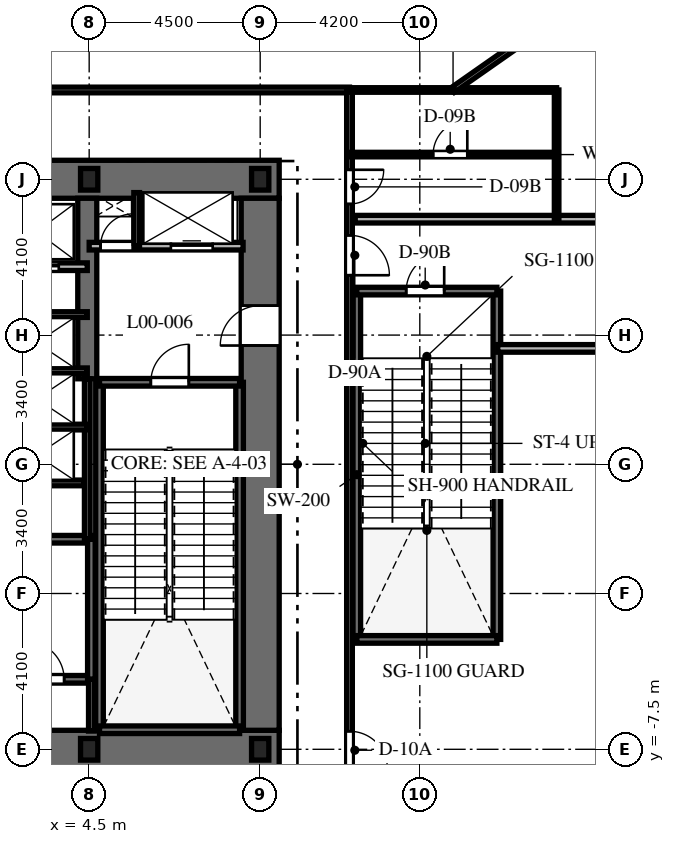
"""IFC4 building model, lengths in metres.
Left out: names, types, materials, properties, quantities, classifications, styles, units other than length and angle.
Written with IfcOpenShell. Run it as: python <this file> out.ifc"""

import sys

from ifc_helpers import new_model, si_unit, direction, frame, frame_2d, origin, origin_2d, place, context, subcontext, project, spatial, rectangle, i_section, extrude, element, fill, save


model = new_model("IFC4")
c1 = context("Model", 3, precision=1e-05, world=origin(), true_north=direction((0.0, 1.0)))
c2 = subcontext(c1, "Body", "Model", "MODEL_VIEW")
j1 = project(units=[si_unit("LENGTHUNIT", "METRE"), si_unit("PLANEANGLEUNIT", "RADIAN")], contexts=[c1])
p1 = place(None, origin())
s1 = spatial("IfcSite", under=j1, at=p1, CompositionType="ELEMENT")
p2 = place(p1, origin())
s2 = spatial("IfcBuilding", under=s1, at=p2, CompositionType="ELEMENT")
p3 = place(p2, origin())
s3 = spatial("IfcBuildingStorey", under=s2, at=p3, CompositionType="ELEMENT", Elevation=0.0)
p4 = place(p3, frame((-9.5, -7.5, 0.0), z_axis=(0.0, 0.0, 1.0), x_axis=(1.0, 0.0, 0.0)))
e1 = element("IfcWall", 1, at=p4, inside=s3, PredefinedType="SHEAR", context=c2, shape_type="SweptSolid", body=[
    extrude(rectangle(XDim=19.0, YDim=1.0, at=frame_2d((9.5, 0.0))), origin(), (0.0, 0.0, 1.0), 6.0),
])
p5 = place(p4, frame((9.55, 0.0, 0.0)))
e2 = element("IfcOpeningElement", 2, at=p5, cuts=e1, PredefinedType="OPENING", context=c2, shape_type="SweptSolid", body=[
    extrude(rectangle(XDim=1.0, YDim=2.15, at=frame_2d((0.5, 1.075))), frame((0.0, 0.51, 0.0), z_axis=(0.0, -1.0, 0.0), x_axis=(1.0, 0.0, 0.0)), (0.0, 0.0, 1.0), 1.02),
])
p6 = place(p3, frame((1.85, 7.5, 0.0), z_axis=(0.0, 0.0, 1.0), x_axis=(1.0, 0.0, 0.0)))
e3 = element("IfcWall", 3, at=p6, inside=s3, PredefinedType="SHEAR", context=c2, shape_type="SweptSolid", body=[
    extrude(rectangle(XDim=7.65, YDim=1.0, at=frame_2d((3.825, 0.0))), origin(), (0.0, 0.0, 1.0), 6.0),
])
p7 = place(p3, frame((9.0, -7.0, 0.0), z_axis=(0.0, 0.0, 1.0), x_axis=(0.0, 1.0, 0.0)))
e4 = element("IfcWall", 4, at=p7, inside=s3, PredefinedType="SHEAR", context=c2, shape_type="SweptSolid", body=[
    extrude(rectangle(XDim=14.0, YDim=1.0, at=frame_2d((7.0, 0.0))), origin(), (0.0, 0.0, 1.0), 6.0),
])
p8 = place(p7, frame((10.125, 0.0, 0.0)))
e5 = element("IfcOpeningElement", 5, at=p8, cuts=e4, PredefinedType="OPENING", context=c2, shape_type="SweptSolid", body=[
    extrude(rectangle(XDim=1.05, YDim=2.15, at=frame_2d((0.525, 1.075))), frame((0.0, 0.51, 0.0), z_axis=(0.0, -1.0, 0.0), x_axis=(1.0, 0.0, 0.0)), (0.0, 0.0, 1.0), 1.02),
])
p9 = place(p3, frame((4.45, 2.25, 0.0), z_axis=(0.0, 0.0, 1.0), x_axis=(0.0, 1.0, 0.0)))
e6 = element("IfcWall", 6, at=p9, inside=s3, PredefinedType="SHEAR", context=c2, shape_type="SweptSolid", body=[
    extrude(rectangle(XDim=4.75, YDim=0.5, at=frame_2d((2.375, 0.0))), origin(), (0.0, 0.0, 1.0), 6.0),
])
for number, where, z_axis, x_axis in (
    (7, (4.772, -6.985, 0.0), (0.0, 0.0, 1.0), (0.0, 1.0, 0.0)),
    (8, (8.458, -6.985, 0.0), (0.0, 0.0, 1.0), (0.0, 1.0, 0.0)),
):
    element("IfcWall", number, at=place(p3, frame(where, z_axis=z_axis, x_axis=x_axis)), inside=s3, PredefinedType="SHEAR", context=c2, shape_type="SweptSolid", body=[
        extrude(rectangle(XDim=9.143, YDim=0.2, at=frame_2d((4.572, 0.0))), origin(), (0.0, 0.0, 1.0), 6.0),
    ])
p10 = place(p3, frame((4.772, -6.985, 0.0), z_axis=(0.0, 0.0, 1.0), x_axis=(1.0, 0.0, 0.0)))
e9 = element("IfcWall", 9, at=p10, inside=s3, PredefinedType="SHEAR", context=c2, shape_type="SweptSolid", body=[
    extrude(rectangle(XDim=3.686, YDim=0.2, at=frame_2d((1.843, 0.0))), origin(), (0.0, 0.0, 1.0), 6.0),
])
p11 = place(p3, frame((4.772, 2.158, 0.0), z_axis=(0.0, 0.0, 1.0), x_axis=(1.0, 0.0, 0.0)))
e10 = element("IfcWall", 10, at=p11, inside=s3, PredefinedType="SHEAR", context=c2, shape_type="SweptSolid", body=[
    extrude(rectangle(XDim=3.686, YDim=0.2, at=frame_2d((1.843, 0.0))), origin(), (0.0, 0.0, 1.0), 6.0),
])
p12 = place(p11, frame((1.35, 0.0, 0.0)))
e11 = element("IfcOpeningElement", 11, at=p12, cuts=e10, PredefinedType="OPENING", context=c2, shape_type="SweptSolid", body=[
    extrude(rectangle(XDim=1.0, YDim=2.15, at=frame_2d((0.5, 1.075))), frame((0.0, 0.11, 0.0), z_axis=(0.0, -1.0, 0.0), x_axis=(1.0, 0.0, 0.0)), (0.0, 0.0, 1.0), 0.22),
])
p13 = place(p3, frame((-4.608, -5.658, 0.0), z_axis=(0.0, 0.0, 1.0), x_axis=(1.0, 0.0, 0.0)))
e12 = element("IfcWall", 12, at=p13, inside=s3, PredefinedType="SHEAR", context=c2, shape_type="SweptSolid", body=[
    extrude(rectangle(XDim=9.166, YDim=0.2, at=frame_2d((4.583, 0.0))), origin(), (0.0, 0.0, 1.0), 6.0),
])
p14 = place(p13, frame((7.45, 0.0, 0.0)))
e13 = element("IfcOpeningElement", 13, at=p14, cuts=e12, PredefinedType="OPENING", context=c2, shape_type="SweptSolid", body=[
    extrude(rectangle(XDim=1.0, YDim=2.15, at=frame_2d((0.5, 1.075))), frame((0.0, 0.11, 0.0), z_axis=(0.0, -1.0, 0.0), x_axis=(1.0, 0.0, 0.0)), (0.0, 0.0, 1.0), 0.22),
])
p15 = place(p3, frame((-4.608, -1.972, 0.0), z_axis=(0.0, 0.0, 1.0), x_axis=(1.0, 0.0, 0.0)))
e14 = element("IfcWall", 14, at=p15, inside=s3, PredefinedType="SHEAR", context=c2, shape_type="SweptSolid", body=[
    extrude(rectangle(XDim=9.166, YDim=0.2, at=frame_2d((4.583, 0.0))), origin(), (0.0, 0.0, 1.0), 6.0),
])
p16 = place(p3, frame((4.558, -5.658, 0.0), z_axis=(0.0, 0.0, 1.0), x_axis=(0.0, 1.0, 0.0)))
e15 = element("IfcWall", 15, at=p16, inside=s3, PredefinedType="SHEAR", context=c2, shape_type="SweptSolid", body=[
    extrude(rectangle(XDim=3.686, YDim=0.2, at=frame_2d((1.843, 0.0))), origin(), (0.0, 0.0, 1.0), 6.0),
])
for number, where, z_axis, x_axis in (
    (16, (11.542, -4.608, 0.0), (0.0, 0.0, 1.0), (0.0, 1.0, 0.0)),
    (17, (15.228, -4.608, 0.0), (0.0, 0.0, 1.0), (0.0, 1.0, 0.0)),
):
    element("IfcWall", number, at=place(p3, frame(where, z_axis=z_axis, x_axis=x_axis)), inside=s3, PredefinedType="SHEAR", context=c2, shape_type="SweptSolid", body=[
        extrude(rectangle(XDim=9.166, YDim=0.2, at=frame_2d((4.583, 0.0))), origin(), (0.0, 0.0, 1.0), 6.0),
    ])
p17 = place(p3, frame((11.542, -4.608, 0.0), z_axis=(0.0, 0.0, 1.0), x_axis=(1.0, 0.0, 0.0)))
e18 = element("IfcWall", 18, at=p17, inside=s3, PredefinedType="SHEAR", context=c2, shape_type="SweptSolid", body=[
    extrude(rectangle(XDim=3.686, YDim=0.2, at=frame_2d((1.843, 0.0))), origin(), (0.0, 0.0, 1.0), 6.0),
])
p18 = place(p3, frame((11.542, 4.558, 0.0), z_axis=(0.0, 0.0, 1.0), x_axis=(1.0, 0.0, 0.0)))
e19 = element("IfcWall", 19, at=p18, inside=s3, PredefinedType="SHEAR", context=c2, shape_type="SweptSolid", body=[
    extrude(rectangle(XDim=3.686, YDim=0.2, at=frame_2d((1.843, 0.0))), origin(), (0.0, 0.0, 1.0), 6.0),
])
p19 = place(p18, frame((1.3, 0.0, 0.0)))
e20 = element("IfcOpeningElement", 20, at=p19, cuts=e19, PredefinedType="OPENING", context=c2, shape_type="SweptSolid", body=[
    extrude(rectangle(XDim=1.0, YDim=2.15, at=frame_2d((0.5, 1.075))), frame((0.0, 0.11, 0.0), z_axis=(0.0, -1.0, 0.0), x_axis=(1.0, 0.0, 0.0)), (0.0, 0.0, 1.0), 0.22),
])
for number, where, z_axis, x_axis in (
    (21, (4.5, -7.5, 0.0), (0.0, 0.0, 1.0), (1.0, 0.0, 0.0)),
    (22, (9.0, -7.5, 0.0), (0.0, 0.0, 1.0), (1.0, 0.0, 0.0)),
    (23, (9.0, 7.5, 0.0), (0.0, 0.0, 1.0), (1.0, 0.0, 0.0)),
    (24, (4.5, 7.5, 0.0), (0.0, 0.0, 1.0), (1.0, 0.0, 0.0)),
):
    element("IfcColumn", number, at=place(p3, frame(where, z_axis=z_axis, x_axis=x_axis)), inside=s3, PredefinedType="COLUMN", context=c2, shape_type="SweptSolid", body=[
        extrude(i_section(OverallWidth=0.454, OverallDepth=0.569, WebThickness=0.078, FlangeThickness=0.125, at=origin_2d()), origin(), (0.0, 0.0, 1.0), 6.0),
    ])
p20 = place(p3, frame((4.558, -7.02, 0.0), z_axis=(0.0, 0.0, 1.0), x_axis=(0.0, 1.0, 0.0)))
e25 = element("IfcWall", 25, at=p20, inside=s3, PredefinedType="PARTITIONING", context=c2, shape_type="SweptSolid", body=[
    extrude(rectangle(XDim=1.362, YDim=0.15, at=frame_2d((0.681, 0.0))), origin(), (0.0, 0.0, 1.0), 5.68),
])
p21 = place(p3, frame((4.5, 5.74, 0.0), z_axis=(0.0, 0.0, 1.0), x_axis=(1.0, 0.0, 0.0)))
e26 = element("IfcWall", 26, at=p21, inside=s3, PredefinedType="PARTITIONING", context=c2, shape_type="SweptSolid", body=[
    extrude(rectangle(XDim=4.05, YDim=0.2, at=frame_2d((2.025, 0.0))), origin(), (0.0, 0.0, 1.0), 5.68),
])
p22 = place(p21, frame((0.3, 0.0, 0.0)))
e27 = element("IfcOpeningElement", 27, at=p22, cuts=e26, PredefinedType="OPENING", context=c2, shape_type="SweptSolid", body=[
    extrude(rectangle(XDim=0.85, YDim=2.03, at=frame_2d((0.425, 1.015))), frame((0.0, 0.11, 0.0), z_axis=(0.0, -1.0, 0.0), x_axis=(1.0, 0.0, 0.0)), (0.0, 0.0, 1.0), 0.22),
])
p23 = place(p21, frame((2.15, 0.0, 0.0)))
e28 = element("IfcOpeningElement", 28, at=p23, cuts=e26, PredefinedType="OPENING", context=c2, shape_type="SweptSolid", body=[
    extrude(rectangle(XDim=1.1, YDim=2.2, at=frame_2d((0.55, 1.1))), frame((0.0, 0.11, 0.0), z_axis=(0.0, -1.0, 0.0), x_axis=(1.0, 0.0, 0.0)), (0.0, 0.0, 1.0), 0.22),
])
p24 = place(p3, frame((5.75, 5.74, 0.0), z_axis=(0.0, 0.0, 1.0), x_axis=(0.0, 1.0, 0.0)))
e29 = element("IfcWall", 29, at=p24, inside=s3, PredefinedType="PARTITIONING", context=c2, shape_type="SweptSolid", body=[
    extrude(rectangle(XDim=1.41, YDim=0.15, at=frame_2d((0.705, 0.0))), origin(), (0.0, 0.0, 1.0), 5.68),
])
p25 = place(p3, frame((1.85, 5.2, 0.0), z_axis=(0.0, 0.0, 1.0), x_axis=(1.0, 0.0, 0.0)))
e30 = element("IfcWall", 30, at=p25, inside=s3, PredefinedType="PARTITIONING", context=c2, shape_type="SweptSolid", body=[
    extrude(rectangle(XDim=2.6, YDim=0.2, at=frame_2d((1.3, 0.0))), origin(), (0.0, 0.0, 1.0), 5.68),
])
p26 = place(p25, frame((0.75, 0.0, 0.0)))
e31 = element("IfcOpeningElement", 31, at=p26, cuts=e30, PredefinedType="OPENING", context=c2, shape_type="SweptSolid", body=[
    extrude(rectangle(XDim=1.1, YDim=2.2, at=frame_2d((0.55, 1.1))), frame((0.0, 0.11, 0.0), z_axis=(0.0, -1.0, 0.0), x_axis=(1.0, 0.0, 0.0)), (0.0, 0.0, 1.0), 0.22),
])
p27 = place(p3, frame((4.45, -1.972, 0.0), z_axis=(0.0, 0.0, 1.0), x_axis=(0.0, 1.0, 0.0)))
e32 = element("IfcWall", 32, at=p27, inside=s3, PredefinedType="PARTITIONING", context=c2, shape_type="SweptSolid", body=[
    extrude(rectangle(XDim=4.222, YDim=0.15, at=frame_2d((2.111, 0.0))), origin(), (0.0, 0.0, 1.0), 5.68),
])
for number, where, z_axis, x_axis in (
    (33, (1.9, 3.94, 0.0), (0.0, 0.0, 1.0), (1.0, 0.0, 0.0)),
    (34, (1.9, 0.98, 0.0), (0.0, 0.0, 1.0), (1.0, 0.0, 0.0)),
    (35, (1.9, 2.46, 0.0), (0.0, 0.0, 1.0), (1.0, 0.0, 0.0)),
):
    element("IfcWall", number, at=place(p3, frame(where, z_axis=z_axis, x_axis=x_axis)), inside=s3, PredefinedType="PARTITIONING", context=c2, shape_type="SweptSolid", body=[
        extrude(rectangle(XDim=2.55, YDim=0.15, at=frame_2d((1.275, 0.0))), origin(), (0.0, 0.0, 1.0), 5.68),
    ])
p28 = place(p3, frame((-4.36, -0.49, 0.0), z_axis=(0.0, 0.0, 1.0), x_axis=(1.0, 0.0, 0.0)))
e36 = element("IfcWall", 36, at=p28, inside=s3, PredefinedType="PARTITIONING", context=c2, shape_type="SweptSolid", body=[
    extrude(rectangle(XDim=8.72, YDim=0.15, at=frame_2d((4.36, 0.0))), origin(), (0.0, 0.0, 1.0), 5.68),
])
p29 = place(p28, frame((3.86, 0.0, 0.0)))
e37 = element("IfcOpeningElement", 37, at=p29, cuts=e36, PredefinedType="OPENING", context=c2, shape_type="SweptSolid", body=[
    extrude(rectangle(XDim=0.9, YDim=2.03, at=frame_2d((0.45, 1.015))), frame((0.0, 0.085, 0.0), z_axis=(0.0, -1.0, 0.0), x_axis=(1.0, 0.0, 0.0)), (0.0, 0.0, 1.0), 0.17),
])
p30 = place(p3, frame((-11.35, 9.85, 0.0), z_axis=(0.0, 0.0, 1.0), x_axis=(1.0, 0.0, 0.0)))
e38 = element("IfcWall", 38, at=p30, inside=s3, PredefinedType="PARTITIONING", context=c2, shape_type="SweptSolid", body=[
    extrude(rectangle(XDim=22.7, YDim=0.15, at=frame_2d((11.35, 0.0))), origin(), (0.0, 0.0, 1.0), 4.722),
])
p31 = place(p30, frame((12.93, 0.0, 0.0)))
e39 = element("IfcOpeningElement", 39, at=p31, cuts=e38, PredefinedType="OPENING", context=c2, shape_type="SweptSolid", body=[
    extrude(rectangle(XDim=1.0, YDim=2.03, at=frame_2d((0.5, 1.015))), frame((0.0, 0.085, 0.0), z_axis=(0.0, -1.0, 0.0), x_axis=(1.0, 0.0, 0.0)), (0.0, 0.0, 1.0), 0.17),
])
p32 = place(p3, frame((11.35, 9.85, 0.0), z_axis=(0.0, 0.0, 1.0), x_axis=(0.0, -1.0, 0.0)))
e40 = element("IfcWall", 40, at=p32, inside=s3, PredefinedType="PARTITIONING", context=c2, shape_type="SweptSolid", body=[
    extrude(rectangle(XDim=19.7, YDim=0.15, at=frame_2d((9.85, 0.0))), origin(), (0.0, 0.0, 1.0), 4.722),
])
p33 = place(p32, frame((3.825, 0.0, 0.0)))
e41 = element("IfcOpeningElement", 41, at=p33, cuts=e40, PredefinedType="OPENING", context=c2, shape_type="SweptSolid", body=[
    extrude(rectangle(XDim=1.05, YDim=2.15, at=frame_2d((0.525, 1.075))), frame((0.0, 0.085, 0.0), z_axis=(0.0, -1.0, 0.0), x_axis=(1.0, 0.0, 0.0)), (0.0, 0.0, 1.0), 0.17),
])
p34 = place(p32, frame((2.1, 0.0, 0.0)))
e42 = element("IfcOpeningElement", 42, at=p34, cuts=e40, PredefinedType="OPENING", context=c2, shape_type="SweptSolid", body=[
    extrude(rectangle(XDim=0.9, YDim=2.03, at=frame_2d((0.45, 1.015))), frame((0.0, 0.085, 0.0), z_axis=(0.0, -1.0, 0.0), x_axis=(1.0, 0.0, 0.0)), (0.0, 0.0, 1.0), 0.17),
])
p35 = place(p32, frame((16.875, 0.0, 0.0)))
e43 = element("IfcOpeningElement", 43, at=p35, cuts=e40, PredefinedType="OPENING", context=c2, shape_type="SweptSolid", body=[
    extrude(rectangle(XDim=1.0, YDim=2.03, at=frame_2d((0.5, 1.015))), frame((0.0, 0.085, 0.0), z_axis=(0.0, -1.0, 0.0), x_axis=(1.0, 0.0, 0.0)), (0.0, 0.0, 1.0), 0.17),
])
p36 = place(p3, frame((11.5, 6.45, 0.0), z_axis=(0.0, 0.0, 1.0), x_axis=(1.0, 0.0, 0.0)))
e44 = element("IfcWall", 44, at=p36, inside=s3, PredefinedType="PARTITIONING", context=c2, shape_type="SweptSolid", body=[
    extrude(rectangle(XDim=16.3, YDim=0.2, at=frame_2d((8.15, 0.0))), origin(), (0.0, 0.0, 1.0), 4.67),
])
p37 = place(p3, frame((15.25, 3.05, 0.0), z_axis=(0.0, 0.0, 1.0), x_axis=(1.0, 0.0, 0.0)))
e45 = element("IfcWall", 45, at=p37, inside=s3, PredefinedType="PARTITIONING", context=c2, shape_type="SweptSolid", body=[
    extrude(rectangle(XDim=12.85, YDim=0.2, at=frame_2d((6.425, 0.0))), origin(), (0.0, 0.0, 1.0), 4.67),
])
p38 = place(p3, frame((16.8, 6.45, 0.0), z_axis=(0.0, 0.0, 1.0), x_axis=(0.0, 1.0, 0.0)))
e46 = element("IfcWall", 46, at=p38, inside=s3, PredefinedType="PARTITIONING", context=c2, shape_type="SweptSolid", body=[
    extrude(rectangle(XDim=3.4, YDim=0.12, at=frame_2d((1.7, 0.0))), origin(), (0.0, 0.0, 1.0), 5.68),
])
p39 = place(p3, frame((11.35, 9.85, 0.0), z_axis=(0.0, 0.0, 1.0), x_axis=(1.0, 0.0, 0.0)))
e47 = element("IfcWall", 47, at=p39, inside=s3, PredefinedType="PARTITIONING", context=c2, shape_type="SweptSolid", body=[
    extrude(rectangle(XDim=5.45, YDim=0.12, at=frame_2d((2.725, 0.0))), origin(), (0.0, 0.0, 1.0), 4.814),
])
p40 = place(p3, frame((11.35, 8.15, 0.0), z_axis=(0.0, 0.0, 1.0), x_axis=(1.0, 0.0, 0.0)))
e48 = element("IfcWall", 48, at=p40, inside=s3, PredefinedType="PARTITIONING", context=c2, shape_type="SweptSolid", body=[
    extrude(rectangle(XDim=5.45, YDim=0.12, at=frame_2d((2.725, 0.0))), origin(), (0.0, 0.0, 1.0), 5.68),
])
p41 = place(p40, frame((2.2, 0.0, 0.0)))
e49 = element("IfcOpeningElement", 49, at=p41, cuts=e48, PredefinedType="OPENING", context=c2, shape_type="SweptSolid", body=[
    extrude(rectangle(XDim=0.9, YDim=2.03, at=frame_2d((0.45, 1.015))), frame((0.0, 0.07, 0.0), z_axis=(0.0, -1.0, 0.0), x_axis=(1.0, 0.0, 0.0)), (0.0, 0.0, 1.0), 0.14),
])
p42 = place(p3, frame((14.067, 9.85, 0.0), z_axis=(0.0, 0.0, 1.0), x_axis=(0.819152520239, 0.573575756623, 0.0)))
e50 = element("IfcWall", 50, at=p42, inside=s3, PredefinedType="PARTITIONING", context=c2, shape_type="SweptSolid", body=[
    extrude(rectangle(XDim=15.892, YDim=0.15, at=frame_2d((7.946, 0.0))), origin(), (0.0, 0.0, 1.0), 4.722),
])
p43 = place(p12, origin())
e51 = element("IfcDoor", 51, at=p43, inside=s3, OperationType="SINGLE_SWING_RIGHT", PredefinedType="DOOR", context=c2, shape_type="SweptSolid", body=[
    extrude(rectangle(XDim=1.0, YDim=2.15, at=frame_2d((0.5, 1.075))), frame((0.0, 0.025, 0.0), z_axis=(0.0, -1.0, 0.0), x_axis=(1.0, 0.0, 0.0)), (0.0, 0.0, 1.0), 0.05),
])
fill(e11, e51)
p44 = place(p14, origin())
e52 = element("IfcDoor", 52, at=p44, inside=s3, OperationType="SINGLE_SWING_LEFT", PredefinedType="DOOR", context=c2, shape_type="SweptSolid", body=[
    extrude(rectangle(XDim=1.0, YDim=2.15, at=frame_2d((0.5, 1.075))), frame((0.0, 0.025, 0.0), z_axis=(0.0, -1.0, 0.0), x_axis=(1.0, 0.0, 0.0)), (0.0, 0.0, 1.0), 0.05),
])
fill(e13, e52)
p45 = place(p8, origin())
e53 = element("IfcDoor", 53, at=p45, inside=s3, OperationType="SINGLE_SWING_LEFT", PredefinedType="DOOR", context=c2, shape_type="SweptSolid", body=[
    extrude(rectangle(XDim=1.05, YDim=2.15, at=frame_2d((0.525, 1.075))), frame((0.0, 0.025, 0.0), z_axis=(0.0, -1.0, 0.0), x_axis=(1.0, 0.0, 0.0)), (0.0, 0.0, 1.0), 0.05),
])
fill(e5, e53)
p46 = place(p22, origin())
e54 = element("IfcDoor", 54, at=p46, inside=s3, OperationType="SINGLE_SWING_RIGHT", PredefinedType="DOOR", context=c2, shape_type="SweptSolid", body=[
    extrude(rectangle(XDim=0.85, YDim=2.03, at=frame_2d((0.425, 1.015))), frame((0.0, 0.025, 0.0), z_axis=(0.0, -1.0, 0.0), x_axis=(1.0, 0.0, 0.0)), (0.0, 0.0, 1.0), 0.05),
])
fill(e27, e54)
p47 = place(p23, origin())
e55 = element("IfcDoor", 55, at=p47, inside=s3, OperationType="SLIDING_TO_RIGHT", PredefinedType="DOOR", context=c2, shape_type="SweptSolid", body=[
    extrude(rectangle(XDim=1.1, YDim=2.2, at=frame_2d((0.55, 1.1))), frame((0.0, 0.025, 0.0), z_axis=(0.0, -1.0, 0.0), x_axis=(1.0, 0.0, 0.0)), (0.0, 0.0, 1.0), 0.05),
])
fill(e28, e55)
p48 = place(p26, origin())
e56 = element("IfcDoor", 56, at=p48, inside=s3, OperationType="SLIDING_TO_RIGHT", PredefinedType="DOOR", context=c2, shape_type="SweptSolid", body=[
    extrude(rectangle(XDim=1.1, YDim=2.2, at=frame_2d((0.55, 1.1))), frame((0.0, 0.025, 0.0), z_axis=(0.0, -1.0, 0.0), x_axis=(1.0, 0.0, 0.0)), (0.0, 0.0, 1.0), 0.05),
])
fill(e31, e56)
p49 = place(p19, origin())
e57 = element("IfcDoor", 57, at=p49, inside=s3, OperationType="SINGLE_SWING_RIGHT", PredefinedType="DOOR", context=c2, shape_type="SweptSolid", body=[
    extrude(rectangle(XDim=1.0, YDim=2.15, at=frame_2d((0.5, 1.075))), frame((0.0, 0.025, 0.0), z_axis=(0.0, -1.0, 0.0), x_axis=(1.0, 0.0, 0.0)), (0.0, 0.0, 1.0), 0.05),
])
fill(e20, e57)
p50 = place(p33, origin())
e58 = element("IfcDoor", 58, at=p50, inside=s3, OperationType="SINGLE_SWING_RIGHT", PredefinedType="DOOR", context=c2, shape_type="SweptSolid", body=[
    extrude(rectangle(XDim=1.05, YDim=2.15, at=frame_2d((0.525, 1.075))), frame((0.0, 0.025, 0.0), z_axis=(0.0, -1.0, 0.0), x_axis=(1.0, 0.0, 0.0)), (0.0, 0.0, 1.0), 0.05),
])
fill(e41, e58)
p51 = place(p34, origin())
e59 = element("IfcDoor", 59, at=p51, inside=s3, OperationType="SINGLE_SWING_LEFT", PredefinedType="DOOR", context=c2, shape_type="SweptSolid", body=[
    extrude(rectangle(XDim=0.9, YDim=2.03, at=frame_2d((0.45, 1.015))), frame((0.0, 0.025, 0.0), z_axis=(0.0, -1.0, 0.0), x_axis=(1.0, 0.0, 0.0)), (0.0, 0.0, 1.0), 0.05),
])
fill(e42, e59)
p52 = place(p41, origin())
e60 = element("IfcDoor", 60, at=p52, inside=s3, OperationType="SINGLE_SWING_RIGHT", PredefinedType="DOOR", context=c2, shape_type="SweptSolid", body=[
    extrude(rectangle(XDim=0.9, YDim=2.03, at=frame_2d((0.45, 1.015))), frame((0.0, 0.025, 0.0), z_axis=(0.0, -1.0, 0.0), x_axis=(1.0, 0.0, 0.0)), (0.0, 0.0, 1.0), 0.05),
])
fill(e49, e60)
p53 = place(p35, origin())
e61 = element("IfcDoor", 61, at=p53, inside=s3, OperationType="SINGLE_SWING_RIGHT", PredefinedType="DOOR", context=c2, shape_type="SweptSolid", body=[
    extrude(rectangle(XDim=1.0, YDim=2.03, at=frame_2d((0.5, 1.015))), frame((0.0, 0.025, 0.0), z_axis=(0.0, -1.0, 0.0), x_axis=(1.0, 0.0, 0.0)), (0.0, 0.0, 1.0), 0.05),
])
fill(e43, e61)
save(model, sys.argv[1])
